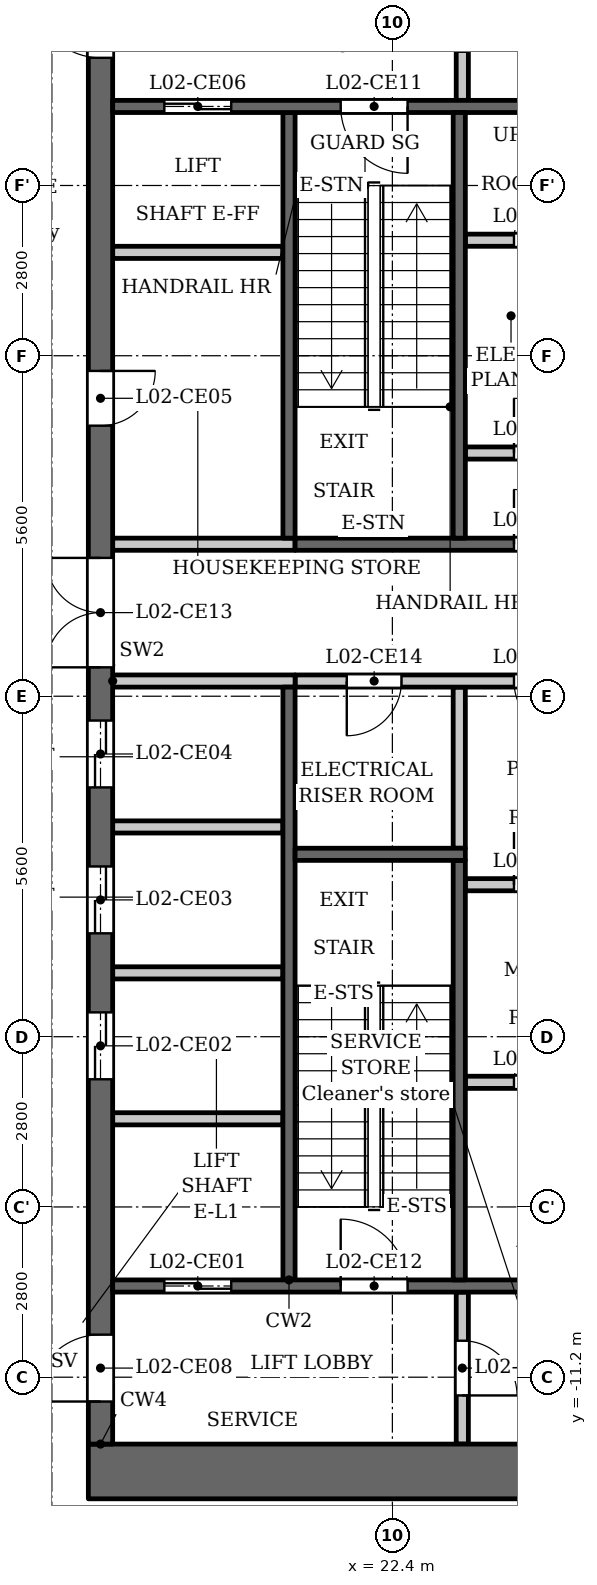
"""IFC4 building model, lengths in metres.
Left out: names, types, materials, properties, quantities, classifications, styles, units other than length and angle.
Written with IfcOpenShell. Run it as: python <this file> out.ifc"""

import sys

from ifc_helpers import new_model, si_unit, direction, frame, frame_2d, origin, place, context, subcontext, project, spatial, rectangle, extrude, element, fill, save


model = new_model("IFC4")
c1 = context("Model", 3, precision=1e-05, world=origin(), true_north=direction((0.0, 1.0)))
c2 = subcontext(c1, "Body", "Model", "MODEL_VIEW")
j1 = project(units=[si_unit("LENGTHUNIT", "METRE"), si_unit("PLANEANGLEUNIT", "RADIAN")], contexts=[c1])
p1 = place(None, origin())
s1 = spatial("IfcSite", under=j1, at=p1, CompositionType="ELEMENT")
p2 = place(p1, origin())
s2 = spatial("IfcBuilding", under=s1, at=p2, CompositionType="ELEMENT")
p3 = place(p2, frame((0.0, 0.0, 11.3)))
s3 = spatial("IfcBuildingStorey", under=s2, at=p3, CompositionType="ELEMENT", Elevation=11.3)
p4 = place(p3, frame((23.5, -2.5, 0.0), z_axis=(0.0, 0.0, 1.0), x_axis=(0.0, 1.0, 0.0)))
e1 = element("IfcWall", 1, at=p4, inside=s3, PredefinedType="PARTITIONING", context=c2, shape_type="SweptSolid", body=[
    extrude(rectangle(XDim=2.65, YDim=0.2, at=frame_2d((1.325, 0.0))), origin(), (0.0, 0.0, 1.0), 4.45),
])
p5 = place(p3, frame((20.7, 2.6, 0.0), z_axis=(0.0, 0.0, 1.0), x_axis=(0.0, 1.0, 0.0)))
e2 = element("IfcWall", 2, at=p5, inside=s3, PredefinedType="SHEAR", context=c2, shape_type="SweptSolid", body=[
    extrude(rectangle(XDim=7.0, YDim=0.2, at=frame_2d((3.5, 0.0))), origin(), (0.0, 0.0, 1.0), 4.45),
])
p6 = place(p3, frame((20.7, -9.6, 0.0), z_axis=(0.0, 0.0, 1.0), x_axis=(0.0, 1.0, 0.0)))
e3 = element("IfcWall", 3, at=p6, inside=s3, PredefinedType="SHEAR", context=c2, shape_type="SweptSolid", body=[
    extrude(rectangle(XDim=9.75, YDim=0.2, at=frame_2d((4.875, 0.0))), origin(), (0.0, 0.0, 1.0), 4.45),
])
p7 = place(p3, frame((20.8, 2.5, 0.0), z_axis=(0.0, 0.0, 1.0), x_axis=(1.0, 0.0, 0.0)))
e4 = element("IfcWall", 4, at=p7, inside=s3, PredefinedType="SHEAR", context=c2, shape_type="SweptSolid", body=[
    extrude(rectangle(XDim=5.3, YDim=0.2, at=frame_2d((2.65, 0.0))), origin(), (0.0, 0.0, 1.0), 4.45),
])
p8 = place(p7, frame((3.6, 0.0, 0.0)))
e5 = element("IfcOpeningElement", 5, at=p8, cuts=e4, PredefinedType="OPENING", context=c2, shape_type="SweptSolid", body=[
    extrude(rectangle(XDim=0.9, YDim=2.1, at=frame_2d((0.45, 1.05))), frame((0.0, 0.11, 0.0), z_axis=(0.0, -1.0, 0.0), x_axis=(1.0, 0.0, 0.0)), (0.0, 0.0, 1.0), 0.22),
])
p9 = place(p3, frame((20.8, 0.25, 0.0), z_axis=(0.0, 0.0, 1.0), x_axis=(1.0, 0.0, 0.0)))
e6 = element("IfcWall", 6, at=p9, inside=s3, PredefinedType="PARTITIONING", context=c2, shape_type="SweptSolid", body=[
    extrude(rectangle(XDim=5.3, YDim=0.2, at=frame_2d((2.65, 0.0))), origin(), (0.0, 0.0, 1.0), 4.45),
])
p10 = place(p9, frame((0.85, 0.0, 0.0)))
e7 = element("IfcOpeningElement", 7, at=p10, cuts=e6, PredefinedType="OPENING", context=c2, shape_type="SweptSolid", body=[
    extrude(rectangle(XDim=0.9, YDim=2.1, at=frame_2d((0.45, 1.05))), frame((0.0, 0.11, 0.0), z_axis=(0.0, -1.0, 0.0), x_axis=(1.0, 0.0, 0.0)), (0.0, 0.0, 1.0), 0.22),
])
p11 = place(p9, frame((3.6, 0.0, 0.0)))
e8 = element("IfcOpeningElement", 8, at=p11, cuts=e6, PredefinedType="OPENING", context=c2, shape_type="SweptSolid", body=[
    extrude(rectangle(XDim=0.9, YDim=2.1, at=frame_2d((0.45, 1.05))), frame((0.0, 0.11, 0.0), z_axis=(0.0, -1.0, 0.0), x_axis=(1.0, 0.0, 0.0)), (0.0, 0.0, 1.0), 0.22),
])
p12 = place(p3, frame((17.4, -12.75, 0.0), z_axis=(0.0, 0.0, 1.0), x_axis=(1.0, 0.0, 0.0)))
e9 = element("IfcWall", 9, at=p12, inside=s3, PredefinedType="SHEAR", context=c2, shape_type="SweptSolid", body=[
    extrude(rectangle(XDim=10.4, YDim=0.9, at=frame_2d((5.2, 0.0))), origin(), (0.0, 0.0, 1.0), 4.45),
])
p13 = place(p3, frame((17.6, -12.3, 0.0), z_axis=(0.0, 0.0, 1.0), x_axis=(0.0, 1.0, 0.0)))
e10 = element("IfcWall", 10, at=p13, inside=s3, PredefinedType="SHEAR", context=c2, shape_type="SweptSolid", body=[
    extrude(rectangle(XDim=24.6, YDim=0.4, at=frame_2d((12.3, 0.0))), origin(), (0.0, 0.0, 1.0), 4.45),
])
p14 = place(p13, frame((6.0, 0.0, 0.0)))
e11 = element("IfcOpeningElement", 11, at=p14, cuts=e10, PredefinedType="OPENING", context=c2, shape_type="SweptSolid", body=[
    extrude(rectangle(XDim=1.1, YDim=2.1, at=frame_2d((0.55, 1.05))), frame((0.0, 0.21, 0.0), z_axis=(0.0, -1.0, 0.0), x_axis=(1.0, 0.0, 0.0)), (0.0, 0.0, 1.0), 0.42),
])
p15 = place(p13, frame((8.4, 0.0, 0.0)))
e12 = element("IfcOpeningElement", 12, at=p15, cuts=e10, PredefinedType="OPENING", context=c2, shape_type="SweptSolid", body=[
    extrude(rectangle(XDim=1.1, YDim=2.1, at=frame_2d((0.55, 1.05))), frame((0.0, 0.21, 0.0), z_axis=(0.0, -1.0, 0.0), x_axis=(1.0, 0.0, 0.0)), (0.0, 0.0, 1.0), 0.42),
])
p16 = place(p13, frame((10.8, 0.0, 0.0)))
e13 = element("IfcOpeningElement", 13, at=p16, cuts=e10, PredefinedType="OPENING", context=c2, shape_type="SweptSolid", body=[
    extrude(rectangle(XDim=1.1, YDim=2.1, at=frame_2d((0.55, 1.05))), frame((0.0, 0.21, 0.0), z_axis=(0.0, -1.0, 0.0), x_axis=(1.0, 0.0, 0.0)), (0.0, 0.0, 1.0), 0.42),
])
p17 = place(p13, frame((16.75, 0.0, 0.0)))
e14 = element("IfcOpeningElement", 14, at=p17, cuts=e10, PredefinedType="OPENING", context=c2, shape_type="SweptSolid", body=[
    extrude(rectangle(XDim=0.9, YDim=2.1, at=frame_2d((0.45, 1.05))), frame((0.0, 0.21, 0.0), z_axis=(0.0, -1.0, 0.0), x_axis=(1.0, 0.0, 0.0)), (0.0, 0.0, 1.0), 0.42),
])
p18 = place(p13, frame((22.8, 0.0, 0.0)))
e15 = element("IfcOpeningElement", 15, at=p18, cuts=e10, PredefinedType="OPENING", context=c2, shape_type="SweptSolid", body=[
    extrude(rectangle(XDim=1.1, YDim=2.1, at=frame_2d((0.55, 1.05))), frame((0.0, 0.21, 0.0), z_axis=(0.0, -1.0, 0.0), x_axis=(1.0, 0.0, 0.0)), (0.0, 0.0, 1.0), 0.42),
])
p19 = place(p13, frame((0.7, 0.0, 0.0)))
e16 = element("IfcOpeningElement", 16, at=p19, cuts=e10, PredefinedType="OPENING", context=c2, shape_type="SweptSolid", body=[
    extrude(rectangle(XDim=1.1, YDim=2.1, at=frame_2d((0.55, 1.05))), frame((0.0, 0.21, 0.0), z_axis=(0.0, -1.0, 0.0), x_axis=(1.0, 0.0, 0.0)), (0.0, 0.0, 1.0), 0.42),
])
p20 = place(p13, frame((12.775, 0.0, 0.0)))
e17 = element("IfcOpeningElement", 17, at=p20, cuts=e10, PredefinedType="OPENING", context=c2, shape_type="SweptSolid", body=[
    extrude(rectangle(XDim=1.8, YDim=2.1, at=frame_2d((0.9, 1.05))), frame((0.0, 0.21, 0.0), z_axis=(0.0, -1.0, 0.0), x_axis=(1.0, 0.0, 0.0)), (0.0, 0.0, 1.0), 0.42),
])
p21 = place(p3, frame((23.55, 9.8, 0.0), z_axis=(0.0, 0.0, 1.0), x_axis=(0.0, 1.0, 0.0)))
e18 = element("IfcWall", 18, at=p21, inside=s3, PredefinedType="PARTITIONING", context=c2, shape_type="SweptSolid", body=[
    extrude(rectangle(XDim=2.5, YDim=0.2, at=frame_2d((1.25, 0.0))), origin(), (0.0, 0.0, 1.0), 4.45),
])
p22 = place(p21, frame((0.8, 0.0, 0.0)))
e19 = element("IfcOpeningElement", 19, at=p22, cuts=e18, PredefinedType="OPENING", context=c2, shape_type="SweptSolid", body=[
    extrude(rectangle(XDim=0.9, YDim=2.1, at=frame_2d((0.45, 1.05))), frame((0.0, 0.11, 0.0), z_axis=(0.0, -1.0, 0.0), x_axis=(1.0, 0.0, 0.0)), (0.0, 0.0, 1.0), 0.22),
])
p23 = place(p3, frame((23.55, -12.3, 0.0), z_axis=(0.0, 0.0, 1.0), x_axis=(0.0, 1.0, 0.0)))
e20 = element("IfcWall", 20, at=p23, inside=s3, PredefinedType="PARTITIONING", context=c2, shape_type="SweptSolid", body=[
    extrude(rectangle(XDim=2.5, YDim=0.2, at=frame_2d((1.25, 0.0))), origin(), (0.0, 0.0, 1.0), 4.45),
])
p24 = place(p23, frame((0.8, 0.0, 0.0)))
e21 = element("IfcOpeningElement", 21, at=p24, cuts=e20, PredefinedType="OPENING", context=c2, shape_type="SweptSolid", body=[
    extrude(rectangle(XDim=0.9, YDim=2.1, at=frame_2d((0.45, 1.05))), frame((0.0, 0.11, 0.0), z_axis=(0.0, -1.0, 0.0), x_axis=(1.0, 0.0, 0.0)), (0.0, 0.0, 1.0), 0.22),
])
p25 = place(p3, frame((23.6, -6.35, 0.0), z_axis=(0.0, 0.0, 1.0), x_axis=(1.0, 0.0, 0.0)))
e22 = element("IfcWall", 22, at=p25, inside=s3, PredefinedType="PARTITIONING", context=c2, shape_type="SweptSolid", body=[
    extrude(rectangle(XDim=2.5, YDim=0.2, at=frame_2d((1.25, 0.0))), origin(), (0.0, 0.0, 1.0), 4.45),
])
p26 = place(p25, frame((0.8, 0.0, 0.0)))
e23 = element("IfcOpeningElement", 23, at=p26, cuts=e22, PredefinedType="OPENING", context=c2, shape_type="SweptSolid", body=[
    extrude(rectangle(XDim=0.9, YDim=2.1, at=frame_2d((0.45, 1.05))), frame((0.0, 0.11, 0.0), z_axis=(0.0, -1.0, 0.0), x_axis=(1.0, 0.0, 0.0)), (0.0, 0.0, 1.0), 0.22),
])
p27 = place(p3, frame((23.6, -3.1, 0.0), z_axis=(0.0, 0.0, 1.0), x_axis=(1.0, 0.0, 0.0)))
e24 = element("IfcWall", 24, at=p27, inside=s3, PredefinedType="PARTITIONING", context=c2, shape_type="SweptSolid", body=[
    extrude(rectangle(XDim=2.5, YDim=0.2, at=frame_2d((1.25, 0.0))), origin(), (0.0, 0.0, 1.0), 4.45),
])
p28 = place(p27, frame((0.8, 0.0, 0.0)))
e25 = element("IfcOpeningElement", 25, at=p28, cuts=e24, PredefinedType="OPENING", context=c2, shape_type="SweptSolid", body=[
    extrude(rectangle(XDim=0.9, YDim=2.1, at=frame_2d((0.45, 1.05))), frame((0.0, 0.11, 0.0), z_axis=(0.0, -1.0, 0.0), x_axis=(1.0, 0.0, 0.0)), (0.0, 0.0, 1.0), 0.22),
])
p29 = place(p3, frame((23.6, 4.0, 0.0), z_axis=(0.0, 0.0, 1.0), x_axis=(1.0, 0.0, 0.0)))
e26 = element("IfcWall", 26, at=p29, inside=s3, PredefinedType="PARTITIONING", context=c2, shape_type="SweptSolid", body=[
    extrude(rectangle(XDim=2.5, YDim=0.2, at=frame_2d((1.25, 0.0))), origin(), (0.0, 0.0, 1.0), 4.45),
])
p30 = place(p29, frame((0.8, 0.0, 0.0)))
e27 = element("IfcOpeningElement", 27, at=p30, cuts=e26, PredefinedType="OPENING", context=c2, shape_type="SweptSolid", body=[
    extrude(rectangle(XDim=0.9, YDim=2.1, at=frame_2d((0.45, 1.05))), frame((0.0, 0.11, 0.0), z_axis=(0.0, -1.0, 0.0), x_axis=(1.0, 0.0, 0.0)), (0.0, 0.0, 1.0), 0.22),
])
p31 = place(p3, frame((23.6, 7.5, 0.0), z_axis=(0.0, 0.0, 1.0), x_axis=(1.0, 0.0, 0.0)))
e28 = element("IfcWall", 28, at=p31, inside=s3, PredefinedType="PARTITIONING", context=c2, shape_type="SweptSolid", body=[
    extrude(rectangle(XDim=2.5, YDim=0.2, at=frame_2d((1.25, 0.0))), origin(), (0.0, 0.0, 1.0), 4.45),
])
p32 = place(p31, frame((0.8, 0.0, 0.0)))
e29 = element("IfcOpeningElement", 29, at=p32, cuts=e28, PredefinedType="OPENING", context=c2, shape_type="SweptSolid", body=[
    extrude(rectangle(XDim=0.9, YDim=2.1, at=frame_2d((0.45, 1.05))), frame((0.0, 0.11, 0.0), z_axis=(0.0, -1.0, 0.0), x_axis=(1.0, 0.0, 0.0)), (0.0, 0.0, 1.0), 0.22),
])
p33 = place(p3, frame((17.8, -9.7, 0.0), z_axis=(0.0, 0.0, 1.0), x_axis=(1.0, 0.0, 0.0)))
e30 = element("IfcWall", 30, at=p33, inside=s3, PredefinedType="SHEAR", context=c2, shape_type="SweptSolid", body=[
    extrude(rectangle(XDim=8.3, YDim=0.2, at=frame_2d((4.15, 0.0))), origin(), (0.0, 0.0, 1.0), 4.45),
])
p34 = place(p33, frame((0.85, 0.0, 0.0)))
e31 = element("IfcOpeningElement", 31, at=p34, cuts=e30, PredefinedType="OPENING", context=c2, shape_type="SweptSolid", body=[
    extrude(rectangle(XDim=1.1, YDim=2.1, at=frame_2d((0.55, 1.05))), frame((0.0, 0.11, 0.0), z_axis=(0.0, -1.0, 0.0), x_axis=(1.0, 0.0, 0.0)), (0.0, 0.0, 1.0), 0.22),
])
p35 = place(p33, frame((3.75, 0.0, 0.0)))
e32 = element("IfcOpeningElement", 32, at=p35, cuts=e30, PredefinedType="OPENING", context=c2, shape_type="SweptSolid", body=[
    extrude(rectangle(XDim=1.1, YDim=2.1, at=frame_2d((0.55, 1.05))), frame((0.0, 0.11, 0.0), z_axis=(0.0, -1.0, 0.0), x_axis=(1.0, 0.0, 0.0)), (0.0, 0.0, 1.0), 0.22),
])
for number, where, z_axis, x_axis in (
    (33, (17.8, -6.95, 0.0), (0.0, 0.0, 1.0), (1.0, 0.0, 0.0)),
    (34, (17.8, -4.55, 0.0), (0.0, 0.0, 1.0), (1.0, 0.0, 0.0)),
    (35, (17.8, -2.15, 0.0), (0.0, 0.0, 1.0), (1.0, 0.0, 0.0)),
):
    element("IfcWall", number, at=place(p3, frame(where, z_axis=z_axis, x_axis=x_axis)), inside=s3, PredefinedType="PARTITIONING", context=c2, shape_type="SweptSolid", body=[
        extrude(rectangle(XDim=2.8, YDim=0.2, at=frame_2d((1.4, 0.0))), origin(), (0.0, 0.0, 1.0), 4.45),
    ])
for number, where, z_axis, x_axis in (
    (36, (17.8, 0.25, 0.0), (0.0, 0.0, 1.0), (1.0, 0.0, 0.0)),
    (37, (17.8, 2.5, 0.0), (0.0, 0.0, 1.0), (1.0, 0.0, 0.0)),
):
    element("IfcWall", number, at=place(p3, frame(where, z_axis=z_axis, x_axis=x_axis)), inside=s3, PredefinedType="PARTITIONING", context=c2, shape_type="SweptSolid", body=[
        extrude(rectangle(XDim=3.0, YDim=0.2, at=frame_2d((1.5, 0.0))), origin(), (0.0, 0.0, 1.0), 4.45),
    ])
p36 = place(p3, frame((17.8, 7.3, 0.0), z_axis=(0.0, 0.0, 1.0), x_axis=(1.0, 0.0, 0.0)))
e38 = element("IfcWall", 38, at=p36, inside=s3, PredefinedType="PARTITIONING", context=c2, shape_type="SweptSolid", body=[
    extrude(rectangle(XDim=2.8, YDim=0.2, at=frame_2d((1.4, 0.0))), origin(), (0.0, 0.0, 1.0), 4.45),
])
p37 = place(p3, frame((17.8, 9.7, 0.0), z_axis=(0.0, 0.0, 1.0), x_axis=(1.0, 0.0, 0.0)))
e39 = element("IfcWall", 39, at=p37, inside=s3, PredefinedType="SHEAR", context=c2, shape_type="SweptSolid", body=[
    extrude(rectangle(XDim=8.3, YDim=0.2, at=frame_2d((4.15, 0.0))), origin(), (0.0, 0.0, 1.0), 4.45),
])
p38 = place(p37, frame((0.85, 0.0, 0.0)))
e40 = element("IfcOpeningElement", 40, at=p38, cuts=e39, PredefinedType="OPENING", context=c2, shape_type="SweptSolid", body=[
    extrude(rectangle(XDim=1.1, YDim=2.1, at=frame_2d((0.55, 1.05))), frame((0.0, 0.11, 0.0), z_axis=(0.0, -1.0, 0.0), x_axis=(1.0, 0.0, 0.0)), (0.0, 0.0, 1.0), 0.22),
])
p39 = place(p37, frame((3.75, 0.0, 0.0)))
e41 = element("IfcOpeningElement", 41, at=p39, cuts=e39, PredefinedType="OPENING", context=c2, shape_type="SweptSolid", body=[
    extrude(rectangle(XDim=1.1, YDim=2.1, at=frame_2d((0.55, 1.05))), frame((0.0, 0.11, 0.0), z_axis=(0.0, -1.0, 0.0), x_axis=(1.0, 0.0, 0.0)), (0.0, 0.0, 1.0), 0.22),
])
p40 = place(p3, frame((23.5, 2.6, 0.0), z_axis=(0.0, 0.0, 1.0), x_axis=(0.0, 1.0, 0.0)))
e42 = element("IfcWall", 42, at=p40, inside=s3, PredefinedType="SHEAR", context=c2, shape_type="SweptSolid", body=[
    extrude(rectangle(XDim=7.0, YDim=0.2, at=frame_2d((3.5, 0.0))), origin(), (0.0, 0.0, 1.0), 4.45),
])
p41 = place(p3, frame((23.5, -9.6, 0.0), z_axis=(0.0, 0.0, 1.0), x_axis=(0.0, 1.0, 0.0)))
e43 = element("IfcWall", 43, at=p41, inside=s3, PredefinedType="SHEAR", context=c2, shape_type="SweptSolid", body=[
    extrude(rectangle(XDim=6.9, YDim=0.2, at=frame_2d((3.45, 0.0))), origin(), (0.0, 0.0, 1.0), 4.45),
])
p42 = place(p3, frame((20.8, -2.6, 0.0), z_axis=(0.0, 0.0, 1.0), x_axis=(1.0, 0.0, 0.0)))
e44 = element("IfcWall", 44, at=p42, inside=s3, PredefinedType="SHEAR", context=c2, shape_type="SweptSolid", body=[
    extrude(rectangle(XDim=2.8, YDim=0.2, at=frame_2d((1.4, 0.0))), origin(), (0.0, 0.0, 1.0), 4.45),
])
p43 = place(p34, origin())
e45 = element("IfcDoor", 45, at=p43, inside=s3, OperationType="DOUBLE_DOOR_SLIDING", PredefinedType="DOOR", context=c2, shape_type="SweptSolid", body=[
    extrude(rectangle(XDim=1.1, YDim=2.1, at=frame_2d((0.55, 1.05))), frame((0.0, 0.025, 0.0), z_axis=(0.0, -1.0, 0.0), x_axis=(1.0, 0.0, 0.0)), (0.0, 0.0, 1.0), 0.05),
])
fill(e31, e45)
p44 = place(p14, origin())
e46 = element("IfcDoor", 46, at=p44, inside=s3, OperationType="DOUBLE_DOOR_SLIDING", PredefinedType="DOOR", context=c2, shape_type="SweptSolid", body=[
    extrude(rectangle(XDim=1.1, YDim=2.1, at=frame_2d((0.55, 1.05))), frame((0.0, 0.025, 0.0), z_axis=(0.0, -1.0, 0.0), x_axis=(1.0, 0.0, 0.0)), (0.0, 0.0, 1.0), 0.05),
])
fill(e11, e46)
p45 = place(p15, origin())
e47 = element("IfcDoor", 47, at=p45, inside=s3, OperationType="DOUBLE_DOOR_SLIDING", PredefinedType="DOOR", context=c2, shape_type="SweptSolid", body=[
    extrude(rectangle(XDim=1.1, YDim=2.1, at=frame_2d((0.55, 1.05))), frame((0.0, 0.025, 0.0), z_axis=(0.0, -1.0, 0.0), x_axis=(1.0, 0.0, 0.0)), (0.0, 0.0, 1.0), 0.05),
])
fill(e12, e47)
p46 = place(p16, origin())
e48 = element("IfcDoor", 48, at=p46, inside=s3, OperationType="DOUBLE_DOOR_SLIDING", PredefinedType="DOOR", context=c2, shape_type="SweptSolid", body=[
    extrude(rectangle(XDim=1.1, YDim=2.1, at=frame_2d((0.55, 1.05))), frame((0.0, 0.025, 0.0), z_axis=(0.0, -1.0, 0.0), x_axis=(1.0, 0.0, 0.0)), (0.0, 0.0, 1.0), 0.05),
])
fill(e13, e48)
p47 = place(p17, origin())
e49 = element("IfcDoor", 49, at=p47, inside=s3, OperationType="SINGLE_SWING_RIGHT", PredefinedType="DOOR", context=c2, shape_type="SweptSolid", body=[
    extrude(rectangle(XDim=0.9, YDim=2.1, at=frame_2d((0.45, 1.05))), frame((0.0, 0.025, 0.0), z_axis=(0.0, -1.0, 0.0), x_axis=(1.0, 0.0, 0.0)), (0.0, 0.0, 1.0), 0.05),
])
fill(e14, e49)
p48 = place(p38, origin())
e50 = element("IfcDoor", 50, at=p48, inside=s3, OperationType="DOUBLE_DOOR_SLIDING", PredefinedType="DOOR", context=c2, shape_type="SweptSolid", body=[
    extrude(rectangle(XDim=1.1, YDim=2.1, at=frame_2d((0.55, 1.05))), frame((0.0, 0.025, 0.0), z_axis=(0.0, -1.0, 0.0), x_axis=(1.0, 0.0, 0.0)), (0.0, 0.0, 1.0), 0.05),
])
fill(e40, e50)
p49 = place(p18, origin())
e51 = element("IfcDoor", 51, at=p49, inside=s3, OperationType="SINGLE_SWING_LEFT", PredefinedType="DOOR", context=c2, shape_type="SweptSolid", body=[
    extrude(rectangle(XDim=1.1, YDim=2.1, at=frame_2d((0.55, 1.05))), frame((0.0, 0.025, 0.0), z_axis=(0.0, -1.0, 0.0), x_axis=(1.0, 0.0, 0.0)), (0.0, 0.0, 1.0), 0.05),
])
fill(e15, e51)
p50 = place(p19, origin())
e52 = element("IfcDoor", 52, at=p50, inside=s3, OperationType="SINGLE_SWING_RIGHT", PredefinedType="DOOR", context=c2, shape_type="SweptSolid", body=[
    extrude(rectangle(XDim=1.1, YDim=2.1, at=frame_2d((0.55, 1.05))), frame((0.0, 0.025, 0.0), z_axis=(0.0, -1.0, 0.0), x_axis=(1.0, 0.0, 0.0)), (0.0, 0.0, 1.0), 0.05),
])
fill(e16, e52)
p51 = place(p24, origin())
e53 = element("IfcDoor", 53, at=p51, inside=s3, OperationType="SINGLE_SWING_LEFT", PredefinedType="DOOR", context=c2, shape_type="SweptSolid", body=[
    extrude(rectangle(XDim=0.9, YDim=2.1, at=frame_2d((0.45, 1.05))), frame((0.0, 0.025, 0.0), z_axis=(0.0, -1.0, 0.0), x_axis=(1.0, 0.0, 0.0)), (0.0, 0.0, 1.0), 0.05),
])
fill(e21, e53)
p52 = place(p39, origin())
e54 = element("IfcDoor", 54, at=p52, inside=s3, OperationType="SINGLE_SWING_RIGHT", PredefinedType="DOOR", context=c2, shape_type="SweptSolid", body=[
    extrude(rectangle(XDim=1.1, YDim=2.1, at=frame_2d((0.55, 1.05))), frame((0.0, 0.025, 0.0), z_axis=(0.0, -1.0, 0.0), x_axis=(1.0, 0.0, 0.0)), (0.0, 0.0, 1.0), 0.05),
])
fill(e41, e54)
p53 = place(p35, origin())
e55 = element("IfcDoor", 55, at=p53, inside=s3, OperationType="SINGLE_SWING_RIGHT", PredefinedType="DOOR", context=c2, shape_type="SweptSolid", body=[
    extrude(rectangle(XDim=1.1, YDim=2.1, at=frame_2d((0.55, 1.05))), frame((0.0, 0.025, 0.0), z_axis=(0.0, -1.0, 0.0), x_axis=(1.0, 0.0, 0.0)), (0.0, 0.0, 1.0), 0.05),
])
fill(e32, e55)
p54 = place(p20, origin())
e56 = element("IfcDoor", 56, at=p54, inside=s3, OperationType="DOUBLE_DOOR_SINGLE_SWING", PredefinedType="DOOR", context=c2, shape_type="SweptSolid", body=[
    extrude(rectangle(XDim=1.8, YDim=2.1, at=frame_2d((0.9, 1.05))), frame((0.0, 0.025, 0.0), z_axis=(0.0, -1.0, 0.0), x_axis=(1.0, 0.0, 0.0)), (0.0, 0.0, 1.0), 0.05),
])
fill(e17, e56)
p55 = place(p10, origin())
e57 = element("IfcDoor", 57, at=p55, inside=s3, OperationType="SINGLE_SWING_LEFT", PredefinedType="DOOR", context=c2, shape_type="SweptSolid", body=[
    extrude(rectangle(XDim=0.9, YDim=2.1, at=frame_2d((0.45, 1.05))), frame((0.0, 0.025, 0.0), z_axis=(0.0, -1.0, 0.0), x_axis=(1.0, 0.0, 0.0)), (0.0, 0.0, 1.0), 0.05),
])
fill(e7, e57)
p56 = place(p26, origin())
e58 = element("IfcDoor", 58, at=p56, inside=s3, OperationType="SINGLE_SWING_LEFT", PredefinedType="DOOR", context=c2, shape_type="SweptSolid", body=[
    extrude(rectangle(XDim=0.9, YDim=2.1, at=frame_2d((0.45, 1.05))), frame((0.0, 0.025, 0.0), z_axis=(0.0, -1.0, 0.0), x_axis=(1.0, 0.0, 0.0)), (0.0, 0.0, 1.0), 0.05),
])
fill(e23, e58)
p57 = place(p28, origin())
e59 = element("IfcDoor", 59, at=p57, inside=s3, OperationType="SINGLE_SWING_RIGHT", PredefinedType="DOOR", context=c2, shape_type="SweptSolid", body=[
    extrude(rectangle(XDim=0.9, YDim=2.1, at=frame_2d((0.45, 1.05))), frame((0.0, 0.025, 0.0), z_axis=(0.0, -1.0, 0.0), x_axis=(1.0, 0.0, 0.0)), (0.0, 0.0, 1.0), 0.05),
])
fill(e25, e59)
p58 = place(p11, origin())
e60 = element("IfcDoor", 60, at=p58, inside=s3, OperationType="SINGLE_SWING_RIGHT", PredefinedType="DOOR", context=c2, shape_type="SweptSolid", body=[
    extrude(rectangle(XDim=0.9, YDim=2.1, at=frame_2d((0.45, 1.05))), frame((0.0, 0.025, 0.0), z_axis=(0.0, -1.0, 0.0), x_axis=(1.0, 0.0, 0.0)), (0.0, 0.0, 1.0), 0.05),
])
fill(e8, e60)
p59 = place(p30, origin())
e61 = element("IfcDoor", 61, at=p59, inside=s3, OperationType="SINGLE_SWING_RIGHT", PredefinedType="DOOR", context=c2, shape_type="SweptSolid", body=[
    extrude(rectangle(XDim=0.9, YDim=2.1, at=frame_2d((0.45, 1.05))), frame((0.0, 0.025, 0.0), z_axis=(0.0, -1.0, 0.0), x_axis=(1.0, 0.0, 0.0)), (0.0, 0.0, 1.0), 0.05),
])
fill(e27, e61)
p60 = place(p32, origin())
e62 = element("IfcDoor", 62, at=p60, inside=s3, OperationType="SINGLE_SWING_LEFT", PredefinedType="DOOR", context=c2, shape_type="SweptSolid", body=[
    extrude(rectangle(XDim=0.9, YDim=2.1, at=frame_2d((0.45, 1.05))), frame((0.0, 0.025, 0.0), z_axis=(0.0, -1.0, 0.0), x_axis=(1.0, 0.0, 0.0)), (0.0, 0.0, 1.0), 0.05),
])
fill(e29, e62)
p61 = place(p8, origin())
e63 = element("IfcDoor", 63, at=p61, inside=s3, OperationType="SINGLE_SWING_RIGHT", PredefinedType="DOOR", context=c2, shape_type="SweptSolid", body=[
    extrude(rectangle(XDim=0.9, YDim=2.1, at=frame_2d((0.45, 1.05))), frame((0.0, 0.025, 0.0), z_axis=(0.0, -1.0, 0.0), x_axis=(1.0, 0.0, 0.0)), (0.0, 0.0, 1.0), 0.05),
])
fill(e5, e63)
save(model, sys.argv[1])
